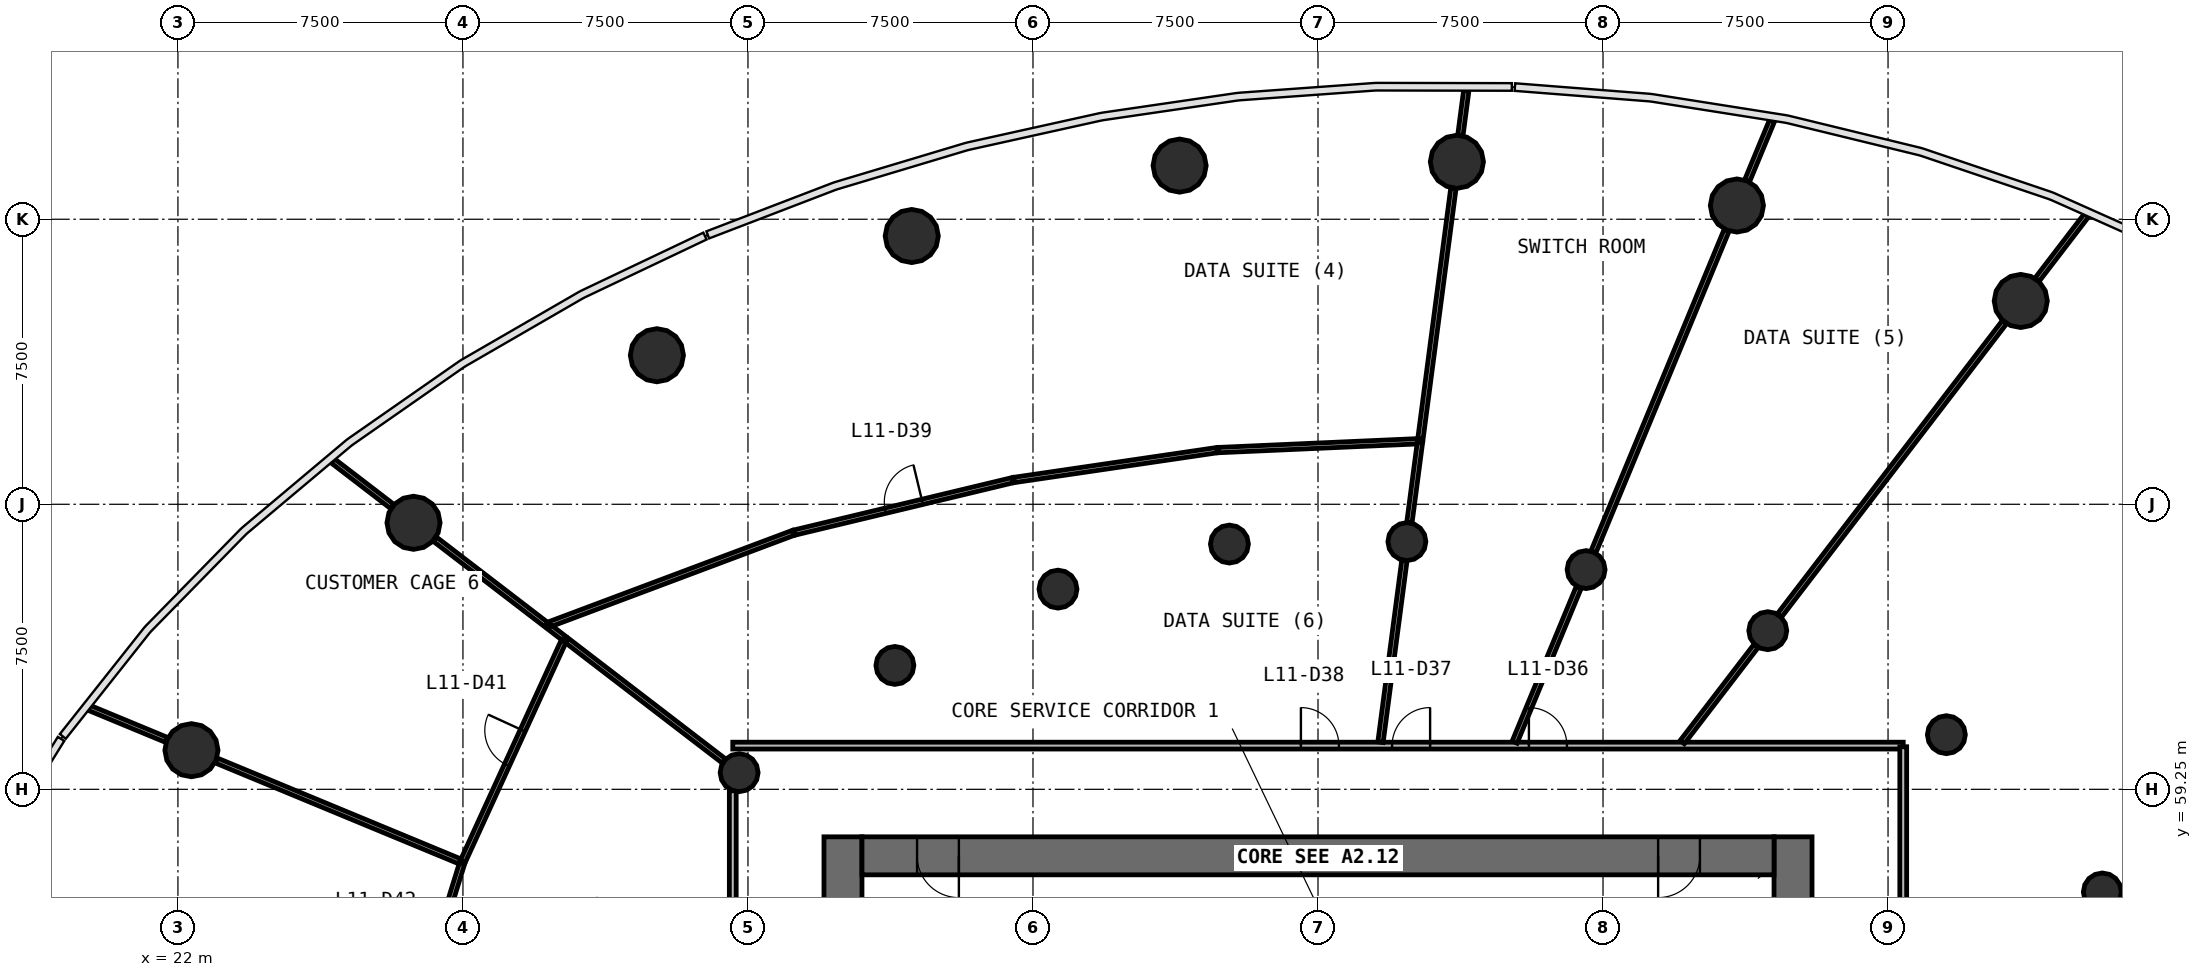
"""IFC4 building model, lengths in metres.
Left out: names, types, materials, properties, quantities, classifications, styles, units other than length and angle.
Written with IfcOpenShell. Run it as: python <this file> out.ifc"""

import sys

from ifc_helpers import new_model, si_unit, direction, frame, frame_2d, origin, origin_2d, place, context, subcontext, project, spatial, rectangle, circle, extrude, source, transform, mapped, element, fill, save


model = new_model("IFC4")
c1 = context("Model", 3, precision=1e-05, world=origin(), true_north=direction((0.0, 1.0)))
c2 = subcontext(c1, "Body", "Model", "MODEL_VIEW")
j1 = project(units=[si_unit("LENGTHUNIT", "METRE"), si_unit("PLANEANGLEUNIT", "RADIAN")], contexts=[c1])
p1 = place(None, origin())
s1 = spatial("IfcSite", under=j1, at=p1, CompositionType="ELEMENT")
p2 = place(p1, origin())
s2 = spatial("IfcBuilding", under=s1, at=p2, CompositionType="ELEMENT")
p3 = place(p2, frame((0.0, 0.0, 49.0)))
s3 = spatial("IfcBuildingStorey", under=s2, at=p3, CompositionType="ELEMENT", Elevation=49.0)
p4 = place(p3, frame((64.5, 38.0, 0.0), z_axis=(0.0, 0.0, 1.0), x_axis=(0.0, 1.0, 0.0)))
e1 = element("IfcWall", 1, at=p4, inside=s3, PredefinedType="SHEAR", context=c2, shape_type="SweptSolid", body=[
    extrude(rectangle(XDim=20.0, YDim=1.0, at=frame_2d((10.0, 0.0))), origin(), (0.0, 0.0, 1.0), 4.4),
])
p5 = place(p4, frame((9.1, 0.0, 0.0)))
e2 = element("IfcOpeningElement", 2, at=p5, cuts=e1, PredefinedType="OPENING", context=c2, shape_type="SweptSolid", body=[
    extrude(rectangle(XDim=1.8, YDim=2.1, at=frame_2d((0.9, 1.05))), frame((0.0, 0.51, 0.0), z_axis=(0.0, -1.0, 0.0), x_axis=(1.0, 0.0, 0.0)), (0.0, 0.0, 1.0), 1.02),
])
p6 = place(p3, frame((39.5, 58.0, 0.0), z_axis=(0.0, 0.0, 1.0), x_axis=(0.0, -1.0, 0.0)))
e3 = element("IfcWall", 3, at=p6, inside=s3, PredefinedType="SHEAR", context=c2, shape_type="SweptSolid", body=[
    extrude(rectangle(XDim=20.0, YDim=1.0, at=frame_2d((10.0, 0.0))), origin(), (0.0, 0.0, 1.0), 4.4),
])
p7 = place(p6, frame((9.1, 0.0, 0.0)))
e4 = element("IfcOpeningElement", 4, at=p7, cuts=e3, PredefinedType="OPENING", context=c2, shape_type="SweptSolid", body=[
    extrude(rectangle(XDim=1.8, YDim=2.1, at=frame_2d((0.9, 1.05))), frame((0.0, 0.51, 0.0), z_axis=(0.0, -1.0, 0.0), x_axis=(1.0, 0.0, 0.0)), (0.0, 0.0, 1.0), 1.02),
])
p8 = place(p3, frame((64.0, 57.5, 0.0), z_axis=(0.0, 0.0, 1.0), x_axis=(-1.0, 0.0, 0.0)))
e5 = element("IfcWall", 5, at=p8, inside=s3, PredefinedType="SHEAR", context=c2, shape_type="SweptSolid", body=[
    extrude(rectangle(XDim=24.0, YDim=1.0, at=frame_2d((12.0, 0.0))), origin(), (0.0, 0.0, 1.0), 4.4),
])
p9 = place(p8, frame((21.45, 0.0, 0.0)))
e6 = element("IfcOpeningElement", 6, at=p9, cuts=e5, PredefinedType="OPENING", context=c2, shape_type="SweptSolid", body=[
    extrude(rectangle(XDim=1.1, YDim=2.1, at=frame_2d((0.55, 1.05))), frame((0.0, 0.51, 0.0), z_axis=(0.0, -1.0, 0.0), x_axis=(1.0, 0.0, 0.0)), (0.0, 0.0, 1.0), 1.02),
])
p10 = place(p8, frame((1.95, 0.0, 0.0)))
e7 = element("IfcOpeningElement", 7, at=p10, cuts=e5, PredefinedType="OPENING", context=c2, shape_type="SweptSolid", body=[
    extrude(rectangle(XDim=1.1, YDim=2.1, at=frame_2d((0.55, 1.05))), frame((0.0, 0.51, 0.0), z_axis=(0.0, -1.0, 0.0), x_axis=(1.0, 0.0, 0.0)), (0.0, 0.0, 1.0), 1.02),
])
m1 = source(origin(), c2, "Body", "SweptSolid", [
    extrude(circle(Radius=0.7, at=origin_2d()), origin(), (0.0, 0.0, 1.0), 4.4),
])
for number, where, z_axis, x_axis in (
    (8, (70.492, 72.1, 0.0), (0.0, 0.0, 1.0), (1.0, 0.0, 0.0)),
    (9, (63.023, 74.611, 0.0), (0.0, 0.0, 1.0), (1.0, 0.0, 0.0)),
    (10, (55.655, 75.761, 0.0), (0.0, 0.0, 1.0), (1.0, 0.0, 0.0)),
    (11, (48.358, 75.661, 0.0), (0.0, 0.0, 1.0), (1.0, 0.0, 0.0)),
    (12, (41.31, 73.809, 0.0), (0.0, 0.0, 1.0), (1.0, 0.0, 0.0)),
    (13, (34.604, 70.672, 0.0), (0.0, 0.0, 1.0), (1.0, 0.0, 0.0)),
    (14, (28.199, 66.263, 0.0), (0.0, 0.0, 1.0), (1.0, 0.0, 0.0)),
    (15, (22.355, 60.279, 0.0), (0.0, 0.0, 1.0), (1.0, 0.0, 0.0)),
):
    element("IfcColumn", number, at=place(p3, frame(where, z_axis=z_axis, x_axis=x_axis)), inside=s3, PredefinedType="COLUMN", context=c2, shape_type="MappedRepresentation", body=[
        mapped(m1, transform((0.0, 0.0, 0.0), scale=1.0)),
    ])
m2 = source(origin(), c2, "Body", "SweptSolid", [
    extrude(circle(Radius=0.5, at=origin_2d()), origin(), (0.0, 0.0, 1.0), 4.4),
])
for number, where, z_axis, x_axis in (
    (16, (72.639, 56.549, 0.0), (0.0, 0.0, 1.0), (1.0, 0.0, 0.0)),
    (17, (68.535, 60.688, 0.0), (0.0, 0.0, 1.0), (1.0, 0.0, 0.0)),
    (18, (63.835, 63.424, 0.0), (0.0, 0.0, 1.0), (1.0, 0.0, 0.0)),
    (19, (59.055, 65.031, 0.0), (0.0, 0.0, 1.0), (1.0, 0.0, 0.0)),
    (20, (54.339, 65.767, 0.0), (0.0, 0.0, 1.0), (1.0, 0.0, 0.0)),
    (21, (49.669, 65.703, 0.0), (0.0, 0.0, 1.0), (1.0, 0.0, 0.0)),
    (22, (45.158, 64.518, 0.0), (0.0, 0.0, 1.0), (1.0, 0.0, 0.0)),
    (23, (40.866, 62.51, 0.0), (0.0, 0.0, 1.0), (1.0, 0.0, 0.0)),
    (24, (36.768, 59.688, 0.0), (0.0, 0.0, 1.0), (1.0, 0.0, 0.0)),
):
    element("IfcColumn", number, at=place(p3, frame(where, z_axis=z_axis, x_axis=x_axis)), inside=s3, PredefinedType="COLUMN", context=c2, shape_type="MappedRepresentation", body=[
        mapped(m2, transform((0.0, 0.0, 0.0), scale=1.0)),
    ])
p11 = place(p3, frame((36.6, 60.4, 0.0), z_axis=(0.0, 0.0, 1.0), x_axis=(1.0, 0.0, 0.0)))
e25 = element("IfcWall", 25, at=p11, inside=s3, PredefinedType="PARTITIONING", context=c2, shape_type="SweptSolid", body=[
    extrude(rectangle(XDim=30.8, YDim=0.18, at=frame_2d((15.4, 0.0))), origin(), (0.0, 0.0, 1.0), 3.05),
])
p12 = place(p11, frame((20.95, 0.0, 0.0)))
e26 = element("IfcOpeningElement", 26, at=p12, cuts=e25, PredefinedType="OPENING", context=c2, shape_type="SweptSolid", body=[
    extrude(rectangle(XDim=1.0, YDim=2.1, at=frame_2d((0.5, 1.05))), frame((0.0, 0.1, 0.0), z_axis=(0.0, -1.0, 0.0), x_axis=(1.0, 0.0, 0.0)), (0.0, 0.0, 1.0), 0.2),
])
p13 = place(p11, frame((17.35, 0.0, 0.0)))
e27 = element("IfcOpeningElement", 27, at=p13, cuts=e25, PredefinedType="OPENING", context=c2, shape_type="SweptSolid", body=[
    extrude(rectangle(XDim=1.0, YDim=2.1, at=frame_2d((0.5, 1.05))), frame((0.0, 0.1, 0.0), z_axis=(0.0, -1.0, 0.0), x_axis=(1.0, 0.0, 0.0)), (0.0, 0.0, 1.0), 0.2),
])
p14 = place(p11, frame((14.95, 0.0, 0.0)))
e28 = element("IfcOpeningElement", 28, at=p14, cuts=e25, PredefinedType="OPENING", context=c2, shape_type="SweptSolid", body=[
    extrude(rectangle(XDim=1.0, YDim=2.1, at=frame_2d((0.5, 1.05))), frame((0.0, 0.1, 0.0), z_axis=(0.0, -1.0, 0.0), x_axis=(1.0, 0.0, 0.0)), (0.0, 0.0, 1.0), 0.2),
])
p15 = place(p3, frame((67.4, 60.37, 0.0), z_axis=(0.0, 0.0, 1.0), x_axis=(0.0, -1.0, 0.0)))
e29 = element("IfcWall", 29, at=p15, inside=s3, PredefinedType="PARTITIONING", context=c2, shape_type="SweptSolid", body=[
    extrude(rectangle(XDim=23.583, YDim=0.18, at=frame_2d((11.791, 0.0))), origin(), (0.0, 0.0, 1.0), 3.05),
])
p16 = place(p15, frame((11.333, 0.0, 0.0)))
e30 = element("IfcOpeningElement", 30, at=p16, cuts=e29, PredefinedType="OPENING", context=c2, shape_type="SweptSolid", body=[
    extrude(rectangle(XDim=1.0, YDim=2.1, at=frame_2d((0.5, 1.05))), frame((0.0, 0.1, 0.0), z_axis=(0.0, -1.0, 0.0), x_axis=(1.0, 0.0, 0.0)), (0.0, 0.0, 1.0), 0.2),
])
p17 = place(p15, frame((9.133, 0.0, 0.0)))
e31 = element("IfcOpeningElement", 31, at=p17, cuts=e29, PredefinedType="OPENING", context=c2, shape_type="SweptSolid", body=[
    extrude(rectangle(XDim=1.0, YDim=2.1, at=frame_2d((0.5, 1.05))), frame((0.0, 0.1, 0.0), z_axis=(0.0, -1.0, 0.0), x_axis=(1.0, 0.0, 0.0)), (0.0, 0.0, 1.0), 0.2),
])
p18 = place(p3, frame((36.6, 35.63, 0.0), z_axis=(0.0, 0.0, 1.0), x_axis=(0.0, 1.0, 0.0)))
e32 = element("IfcWall", 32, at=p18, inside=s3, PredefinedType="PARTITIONING", context=c2, shape_type="SweptSolid", body=[
    extrude(rectangle(XDim=23.583, YDim=0.18, at=frame_2d((11.791, 0.0))), origin(), (0.0, 0.0, 1.0), 3.05),
])
p19 = place(p18, frame((11.333, 0.0, 0.0)))
e33 = element("IfcOpeningElement", 33, at=p19, cuts=e32, PredefinedType="OPENING", context=c2, shape_type="SweptSolid", body=[
    extrude(rectangle(XDim=1.0, YDim=2.1, at=frame_2d((0.5, 1.05))), frame((0.0, 0.1, 0.0), z_axis=(0.0, -1.0, 0.0), x_axis=(1.0, 0.0, 0.0)), (0.0, 0.0, 1.0), 0.2),
])
p20 = place(p18, frame((4.532, 0.0, 0.0)))
e34 = element("IfcOpeningElement", 34, at=p20, cuts=e32, PredefinedType="OPENING", context=c2, shape_type="SweptSolid", body=[
    extrude(rectangle(XDim=1.0, YDim=2.1, at=frame_2d((0.5, 1.05))), frame((0.0, 0.1, 0.0), z_axis=(0.0, -1.0, 0.0), x_axis=(1.0, 0.0, 0.0)), (0.0, 0.0, 1.0), 0.2),
])
p21 = place(p3, frame((64.142, 63.824, 0.0), z_axis=(0.0, 0.0, 1.0), x_axis=(0.608770295053, 0.793346537057, 0.0)))
e35 = element("IfcWall", 35, at=p21, inside=s3, PredefinedType="PARTITIONING", context=c2, shape_type="SweptSolid", body=[
    extrude(rectangle(XDim=9.727, YDim=0.14, at=frame_2d((4.864, 0.0))), origin(), (0.0, 0.0, 1.0), 3.05),
])
p22 = place(p3, frame((59.248, 65.498, 0.0), z_axis=(0.0, 0.0, 1.0), x_axis=(0.382672728165, 0.923883966264, 0.0)))
e36 = element("IfcWall", 36, at=p22, inside=s3, PredefinedType="PARTITIONING", context=c2, shape_type="SweptSolid", body=[
    extrude(rectangle(XDim=9.16, YDim=0.14, at=frame_2d((4.58, 0.0))), origin(), (0.0, 0.0, 1.0), 3.05),
])
p23 = place(p3, frame((29.484, 57.326, 0.0), z_axis=(0.0, 0.0, 1.0), x_axis=(-0.923878476662, 0.3826859814, 0.0)))
e37 = element("IfcWall", 37, at=p23, inside=s3, PredefinedType="PARTITIONING", context=c2, shape_type="SweptSolid", body=[
    extrude(rectangle(XDim=7.011, YDim=0.14, at=frame_2d((3.506, 0.0))), origin(), (0.0, 0.0, 1.0), 3.05),
])
p24 = place(p3, frame((38.19, 65.998, 0.0), z_axis=(0.0, 0.0, 1.0), x_axis=(-0.936297270661, -0.35120851492, 0.0)))
e38 = element("IfcWall", 38, at=p24, inside=s3, PredefinedType="PARTITIONING", context=c2, shape_type="SweptSolid", body=[
    extrude(rectangle(XDim=6.919, YDim=0.14, at=frame_2d((3.459, 0.0))), origin(), (0.0, 0.0, 1.0), 3.05),
])
p25 = place(p3, frame((54.687, 68.411, 0.0), z_axis=(0.0, 0.0, 1.0), x_axis=(0.130547690074, 0.99144203089, 0.0)))
e39 = element("IfcWall", 39, at=p25, inside=s3, PredefinedType="PARTITIONING", context=c2, shape_type="SweptSolid", body=[
    extrude(rectangle(XDim=6.71, YDim=0.14, at=frame_2d((3.355, 0.0))), origin(), (0.0, 0.0, 1.0), 3.05),
])
p26 = place(p3, frame((29.497, 57.354, 0.0), z_axis=(0.0, 0.0, 1.0), x_axis=(0.416308805512, 0.909223283057, 0.0)))
e40 = element("IfcWall", 40, at=p26, inside=s3, PredefinedType="PARTITIONING", context=c2, shape_type="SweptSolid", body=[
    extrude(rectangle(XDim=6.441, YDim=0.14, at=frame_2d((3.22, 0.0))), origin(), (0.0, 0.0, 1.0), 3.05),
])
p27 = place(p26, frame((2.791, 0.0, 0.0)))
e41 = element("IfcOpeningElement", 41, at=p27, cuts=e40, PredefinedType="OPENING", context=c2, shape_type="SweptSolid", body=[
    extrude(rectangle(XDim=1.0, YDim=2.1, at=frame_2d((0.5, 1.05))), frame((0.0, 0.08, 0.0), z_axis=(0.0, -1.0, 0.0), x_axis=(1.0, 0.0, 0.0)), (0.0, 0.0, 1.0), 0.16),
])
p28 = place(p3, frame((27.599, 51.242, 0.0), z_axis=(0.0, 0.0, 1.0), x_axis=(0.296066096507, 0.95516745469, 0.0)))
e42 = element("IfcWall", 42, at=p28, inside=s3, PredefinedType="PARTITIONING", context=c2, shape_type="SweptSolid", body=[
    extrude(rectangle(XDim=6.34, YDim=0.14, at=frame_2d((3.17, 0.0))), origin(), (0.0, 0.0, 1.0), 3.05),
])
p29 = place(p28, frame((2.689, 0.0, 0.0)))
e43 = element("IfcOpeningElement", 43, at=p29, cuts=e42, PredefinedType="OPENING", context=c2, shape_type="SweptSolid", body=[
    extrude(rectangle(XDim=1.0, YDim=2.1, at=frame_2d((0.5, 1.05))), frame((0.0, 0.08, 0.0), z_axis=(0.0, -1.0, 0.0), x_axis=(1.0, 0.0, 0.0)), (0.0, 0.0, 1.0), 0.16),
])
p30 = place(p3, frame((38.219, 66.005, 0.0), z_axis=(0.0, 0.0, 1.0), x_axis=(0.972386552633, 0.233376074734, 0.0)))
e44 = element("IfcWall", 44, at=p30, inside=s3, PredefinedType="PARTITIONING", context=c2, shape_type="SweptSolid", body=[
    extrude(rectangle(XDim=5.915, YDim=0.14, at=frame_2d((2.958, 0.0))), origin(), (0.0, 0.0, 1.0), 3.05),
])
p31 = place(p30, frame((2.465, 0.0, 0.0)))
e45 = element("IfcOpeningElement", 45, at=p31, cuts=e44, PredefinedType="OPENING", context=c2, shape_type="SweptSolid", body=[
    extrude(rectangle(XDim=1.0, YDim=2.1, at=frame_2d((0.5, 1.05))), frame((0.0, 0.08, 0.0), z_axis=(0.0, -1.0, 0.0), x_axis=(1.0, 0.0, 0.0)), (0.0, 0.0, 1.0), 0.16),
])
p32 = place(p3, frame((49.344, 68.175, 0.0), z_axis=(0.0, 0.0, 1.0), x_axis=(-0.989377499091, -0.145369062366, 0.0)))
e46 = element("IfcWall", 46, at=p32, inside=s3, PredefinedType="PARTITIONING", context=c2, shape_type="SweptSolid", body=[
    extrude(rectangle(XDim=5.401, YDim=0.14, at=frame_2d((2.701, 0.0))), origin(), (0.0, 0.0, 1.0), 3.05),
])
p33 = place(p3, frame((54.657, 68.409, 0.0), z_axis=(0.0, 0.0, 1.0), x_axis=(-0.999023656057, -0.044178440869, 0.0)))
e47 = element("IfcWall", 47, at=p33, inside=s3, PredefinedType="PARTITIONING", context=c2, shape_type="SweptSolid", body=[
    extrude(rectangle(XDim=5.289, YDim=0.14, at=frame_2d((2.644, 0.0))), origin(), (0.0, 0.0, 1.0), 3.05),
])
p34 = place(p3, frame((36.367, 59.995, 0.0), z_axis=(0.0, 0.0, 1.0), x_axis=(-0.793353550187, 0.608761155467, 0.0)))
e48 = element("IfcWall", 48, at=p34, inside=s3, PredefinedType="PARTITIONING", context=c2, shape_type="SweptSolid", body=[
    extrude(rectangle(XDim=5.208, YDim=0.14, at=frame_2d((2.604, 0.0))), origin(), (0.0, 0.0, 1.0), 3.05),
])
p35 = place(p3, frame((53.644, 60.49, 0.0), z_axis=(0.0, 0.0, 1.0), x_axis=(0.130523979823, 0.991445152639, 0.0)))
e49 = element("IfcWall", 49, at=p35, inside=s3, PredefinedType="PARTITIONING", context=c2, shape_type="SweptSolid", body=[
    extrude(rectangle(XDim=4.818, YDim=0.14, at=frame_2d((2.409, 0.0))), origin(), (0.0, 0.0, 1.0), 3.05),
])
p36 = place(p3, frame((57.174, 60.49, 0.0), z_axis=(0.0, 0.0, 1.0), x_axis=(0.382672831764, 0.923883923353, 0.0)))
e50 = element("IfcWall", 50, at=p36, inside=s3, PredefinedType="PARTITIONING", context=c2, shape_type="SweptSolid", body=[
    extrude(rectangle(XDim=4.41, YDim=0.14, at=frame_2d((2.205, 0.0))), origin(), (0.0, 0.0, 1.0), 3.05),
])
p37 = place(p3, frame((31.688, 63.586, 0.0), z_axis=(0.0, 0.0, 1.0), x_axis=(-0.793375408023, 0.608732668701, 0.0)))
e51 = element("IfcWall", 51, at=p37, inside=s3, PredefinedType="PARTITIONING", context=c2, shape_type="SweptSolid", body=[
    extrude(rectangle(XDim=3.693, YDim=0.14, at=frame_2d((1.847, 0.0))), origin(), (0.0, 0.0, 1.0), 3.05),
])
p38 = place(p3, frame((61.584, 60.49, 0.0), z_axis=(0.0, 0.0, 1.0), x_axis=(0.60874605662, 0.793365135703, 0.0)))
e52 = element("IfcWall", 52, at=p38, inside=s3, PredefinedType="PARTITIONING", context=c2, shape_type="SweptSolid", body=[
    extrude(rectangle(XDim=3.194, YDim=0.14, at=frame_2d((1.597, 0.0))), origin(), (0.0, 0.0, 1.0), 3.05),
])
p39 = place(p3, frame((21.704, 60.549, 0.0), z_axis=(0.0, 0.0, 1.0), x_axis=(-0.923899948789, 0.382634139392, 0.0)))
e53 = element("IfcWall", 53, at=p39, inside=s3, PredefinedType="PARTITIONING", context=c2, shape_type="SweptSolid", body=[
    extrude(rectangle(XDim=2.215, YDim=0.14, at=frame_2d((1.107, 0.0))), origin(), (0.0, 0.0, 1.0), 3.05),
])
p40 = place(p3, frame((54.405, 66.267, 0.0), z_axis=(0.0, 0.0, 1.0), x_axis=(0.130430814721, 0.991457413393, 0.0)))
e54 = element("IfcWall", 54, at=p40, inside=s3, PredefinedType="PARTITIONING", context=c2, shape_type="SweptSolid", body=[
    extrude(rectangle(XDim=2.132, YDim=0.14, at=frame_2d((1.066, 0.0))), origin(), (0.0, 0.0, 1.0), 3.05),
])
p41 = place(p3, frame((70.921, 72.658, 0.0), z_axis=(0.0, 0.0, 1.0), x_axis=(0.608822106268, 0.793306777306, 0.0)))
e55 = element("IfcWall", 55, at=p41, inside=s3, PredefinedType="PARTITIONING", context=c2, shape_type="SweptSolid", body=[
    extrude(rectangle(XDim=2.152, YDim=0.14, at=frame_2d((1.076, 0.0))), origin(), (0.0, 0.0, 1.0), 3.05),
])
p42 = place(p3, frame((27.641, 66.691, 0.0), z_axis=(0.0, 0.0, 1.0), x_axis=(-0.793312100237, 0.608815170325, 0.0)))
e56 = element("IfcWall", 56, at=p42, inside=s3, PredefinedType="PARTITIONING", context=c2, shape_type="SweptSolid", body=[
    extrude(rectangle(XDim=1.977, YDim=0.14, at=frame_2d((0.989, 0.0))), origin(), (0.0, 0.0, 1.0), 3.05),
])
p43 = place(p3, frame((63.292, 75.263, 0.0), z_axis=(0.0, 0.0, 1.0), x_axis=(0.382632674553, 0.923900555452, 0.0)))
e57 = element("IfcWall", 57, at=p43, inside=s3, PredefinedType="PARTITIONING", context=c2, shape_type="SweptSolid", body=[
    extrude(rectangle(XDim=1.714, YDim=0.14, at=frame_2d((0.857, 0.0))), origin(), (0.0, 0.0, 1.0), 3.05),
])
p44 = place(p3, frame((55.747, 76.46, 0.0), z_axis=(0.0, 0.0, 1.0), x_axis=(0.130449264586, 0.991454986053, 0.0)))
e58 = element("IfcWall", 58, at=p44, inside=s3, PredefinedType="PARTITIONING", context=c2, shape_type="SweptSolid", body=[
    extrude(rectangle(XDim=1.203, YDim=0.14, at=frame_2d((0.602, 0.0))), origin(), (0.0, 0.0, 1.0), 3.05),
])
p45 = place(p3, frame((32.155, 63.228, 0.0), z_axis=(0.0, 0.0, 1.0), x_axis=(-0.793176766219, 0.608991475745, 0.0)))
e59 = element("IfcWall", 59, at=p45, inside=s3, PredefinedType="PARTITIONING", context=c2, shape_type="SweptSolid", body=[
    extrude(rectangle(XDim=0.476, YDim=0.14, at=frame_2d((0.238, 0.0))), origin(), (0.0, 0.0, 1.0), 3.05),
])
m3 = source(origin(), c2, "Body", "SweptSolid", [
    extrude(rectangle(XDim=1.1, YDim=2.1, at=frame_2d((0.55, 1.05))), frame((0.0, 0.025, 0.0), z_axis=(0.0, -1.0, 0.0), x_axis=(1.0, 0.0, 0.0)), (0.0, 0.0, 1.0), 0.05),
])
p46 = place(p9, origin())
e60 = element("IfcDoor", 60, at=p46, inside=s3, OperationType="SINGLE_SWING_LEFT", PredefinedType="DOOR", context=c2, shape_type="MappedRepresentation", body=[
    mapped(m3, transform((0.0, 0.0, 0.0), scale=1.0)),
])
fill(e6, e60)
p47 = place(p10, origin())
e61 = element("IfcDoor", 61, at=p47, inside=s3, OperationType="SINGLE_SWING_RIGHT", PredefinedType="DOOR", context=c2, shape_type="MappedRepresentation", body=[
    mapped(m3, transform((0.0, 0.0, 0.0), scale=1.0)),
])
fill(e7, e61)
m4 = source(origin(), c2, "Body", "SweptSolid", [
    extrude(rectangle(XDim=1.0, YDim=2.1, at=frame_2d((0.5, 1.05))), frame((0.0, 0.025, 0.0), z_axis=(0.0, -1.0, 0.0), x_axis=(1.0, 0.0, 0.0)), (0.0, 0.0, 1.0), 0.05),
])
p48 = place(p12, origin())
e62 = element("IfcDoor", 62, at=p48, inside=s3, OperationType="SINGLE_SWING_LEFT", PredefinedType="DOOR", context=c2, shape_type="MappedRepresentation", body=[
    mapped(m4, transform((0.0, 0.0, 0.0), scale=1.0)),
])
fill(e26, e62)
p49 = place(p13, origin())
e63 = element("IfcDoor", 63, at=p49, inside=s3, OperationType="SINGLE_SWING_RIGHT", PredefinedType="DOOR", context=c2, shape_type="MappedRepresentation", body=[
    mapped(m4, transform((0.0, 0.0, 0.0), scale=1.0)),
])
fill(e27, e63)
p50 = place(p14, origin())
e64 = element("IfcDoor", 64, at=p50, inside=s3, OperationType="SINGLE_SWING_LEFT", PredefinedType="DOOR", context=c2, shape_type="MappedRepresentation", body=[
    mapped(m4, transform((0.0, 0.0, 0.0), scale=1.0)),
])
fill(e28, e64)
p51 = place(p31, origin())
e65 = element("IfcDoor", 65, at=p51, inside=s3, OperationType="SINGLE_SWING_RIGHT", PredefinedType="DOOR", context=c2, shape_type="MappedRepresentation", body=[
    mapped(m4, transform((0.0, 0.0, 0.0), scale=1.0)),
])
fill(e45, e65)
p52 = place(p27, origin())
e66 = element("IfcDoor", 66, at=p52, inside=s3, OperationType="SINGLE_SWING_RIGHT", PredefinedType="DOOR", context=c2, shape_type="MappedRepresentation", body=[
    mapped(m4, transform((0.0, 0.0, 0.0), scale=1.0)),
])
fill(e41, e66)
save(model, sys.argv[1])
